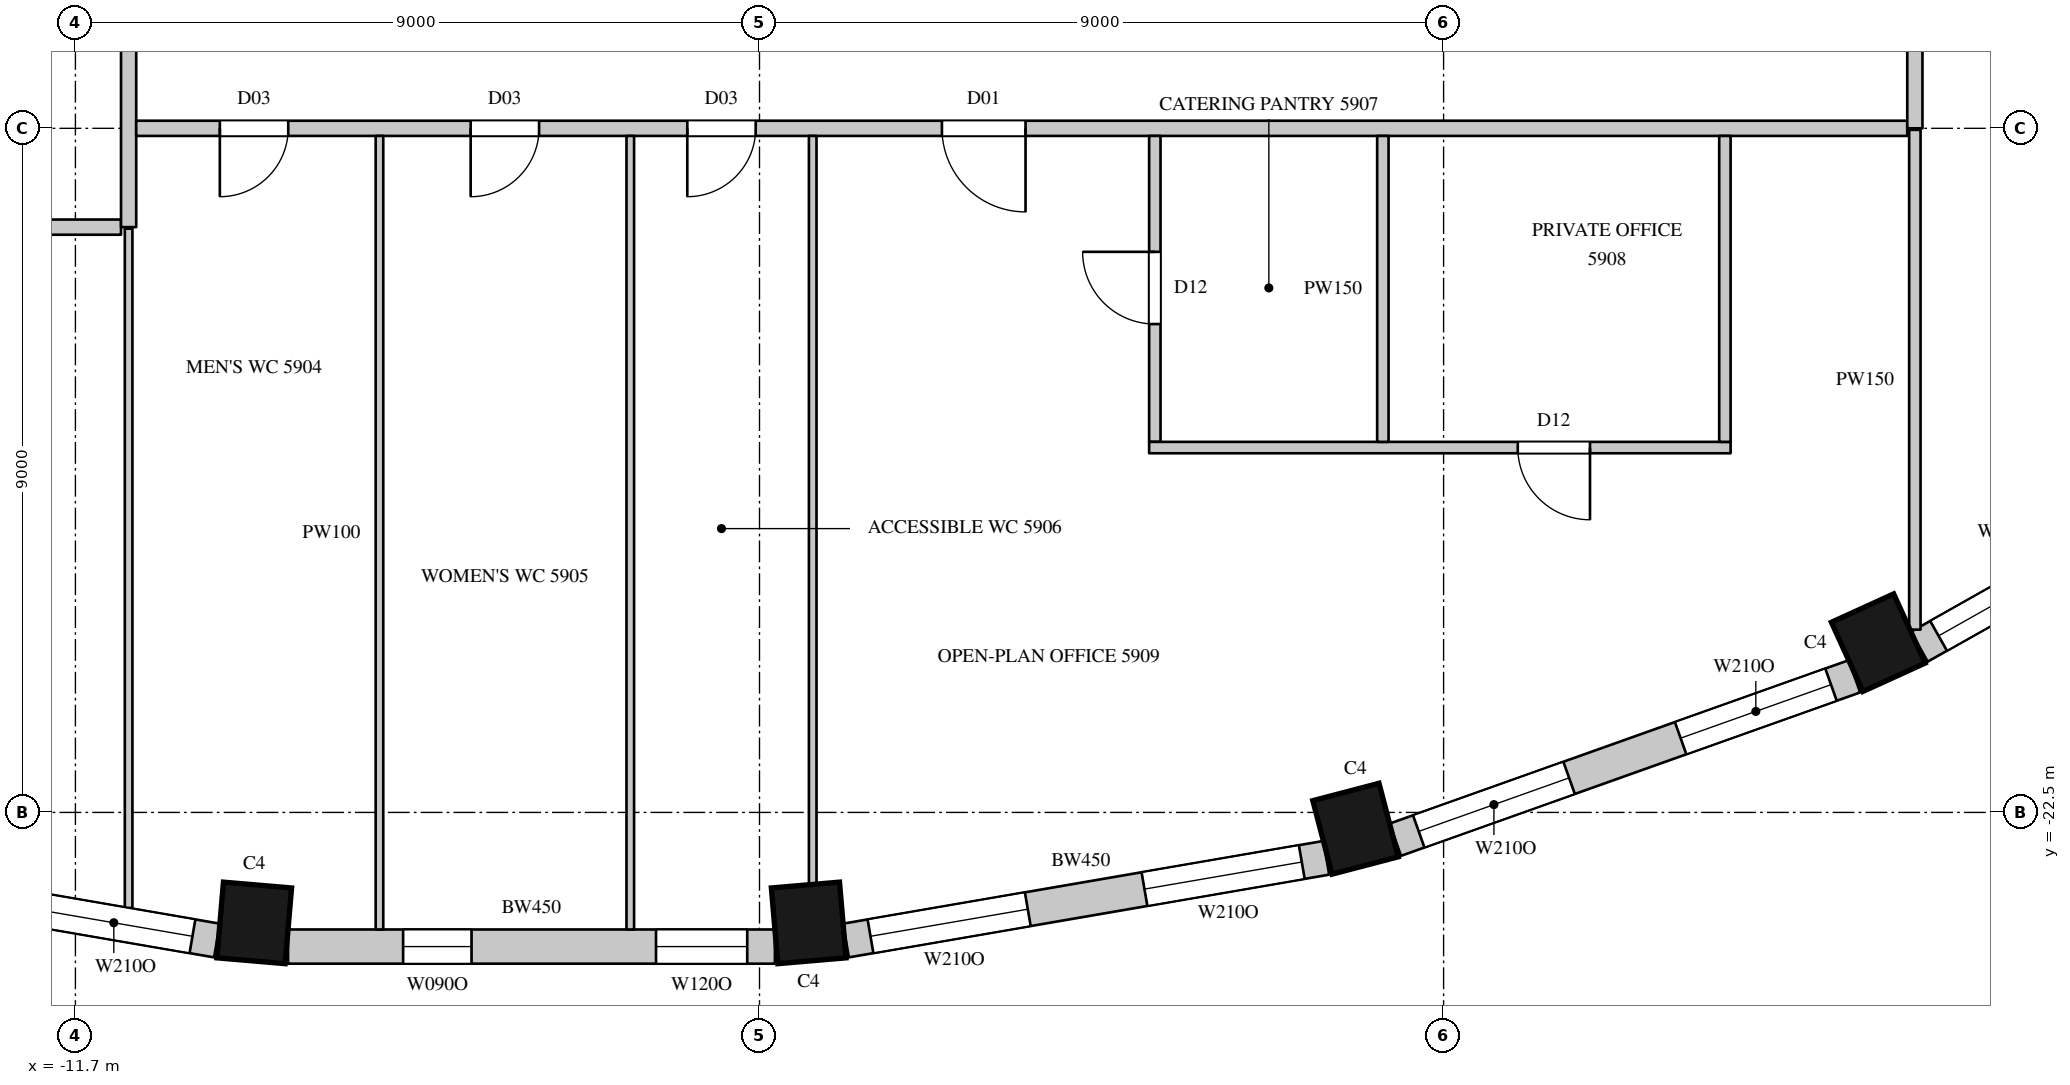
"""IFC4 building model, lengths in metres.
Left out: names, types, materials, properties, quantities, classifications, styles, units other than length and angle.
Written with IfcOpenShell. Run it as: python <this file> out.ifc"""

import sys

from ifc_helpers import new_model, si_unit, direction, frame, frame_2d, origin, origin_2d, place, context, subcontext, project, spatial, rectangle, extrude, element, fill, save


model = new_model("IFC4")
c1 = context("Model", 3, precision=1e-05, world=origin(), true_north=direction((0.0, 1.0)))
c2 = subcontext(c1, "Body", "Model", "MODEL_VIEW")
j1 = project(units=[si_unit("LENGTHUNIT", "METRE"), si_unit("PLANEANGLEUNIT", "RADIAN")], contexts=[c1])
p1 = place(None, origin())
s1 = spatial("IfcSite", under=j1, at=p1, CompositionType="ELEMENT")
p2 = place(p1, origin())
s2 = spatial("IfcBuilding", under=s1, at=p2, CompositionType="ELEMENT")
p3 = place(p2, frame((0.0, 0.0, 263.9)))
s3 = spatial("IfcBuildingStorey", under=s2, at=p3, CompositionType="ELEMENT", Elevation=263.9)
for number, where, z_axis, x_axis in (
    (1, (-9.347, -23.954, 0.0), (0.0, 0.0, 1.0), (0.996, -0.085, 0.0)),
    (2, (-2.053, -23.954, 0.0), (0.0, 0.0, 1.0), (0.996, 0.085, 0.0)),
    (3, (5.142, -22.715, 0.0), (0.0, 0.0, 1.0), (0.967, 0.253, 0.0)),
    (4, (12.019, -20.267, 0.0), (0.0, 0.0, 1.0), (0.91, 0.415, 0.0)),
):
    element("IfcColumn", number, at=place(p3, frame(where, z_axis=z_axis, x_axis=x_axis)), inside=s3, PredefinedType="COLUMN", context=c2, shape_type="SweptSolid", body=[
        extrude(rectangle(XDim=0.9, YDim=1.0, at=origin_2d()), origin(), (0.0, 0.0, 1.0), 4.1),
    ])
p4 = place(p3, frame((-16.157, -23.097, 0.0), z_axis=(0.0, 0.0, 1.0), x_axis=(0.985502073964, -0.169663379113, 0.0)))
e5 = element("IfcWall", 5, at=p4, inside=s3, PredefinedType="SOLIDWALL", context=c2, shape_type="SweptSolid", body=[
    extrude(rectangle(XDim=6.412, YDim=0.45, at=frame_2d((3.206, 0.0))), origin(), (0.0, 0.0, 1.0), 3.8),
])
p5 = place(p4, frame((0.327, 0.0, 1.05)))
e6 = element("IfcOpeningElement", 6, at=p5, cuts=e5, PredefinedType="OPENING", context=c2, shape_type="SweptSolid", body=[
    extrude(rectangle(XDim=2.1, YDim=2.4, at=frame_2d((1.05, 1.2))), frame((0.0, 0.235, 0.0), z_axis=(0.0, -1.0, 0.0), x_axis=(1.0, 0.0, 0.0)), (0.0, 0.0, 1.0), 0.47),
])
p6 = place(p4, frame((3.985, 0.0, 1.05)))
e7 = element("IfcOpeningElement", 7, at=p6, cuts=e5, PredefinedType="OPENING", context=c2, shape_type="SweptSolid", body=[
    extrude(rectangle(XDim=2.1, YDim=2.4, at=frame_2d((1.05, 1.2))), frame((0.0, 0.235, 0.0), z_axis=(0.0, -1.0, 0.0), x_axis=(1.0, 0.0, 0.0)), (0.0, 0.0, 1.0), 0.47),
])
p7 = place(p3, frame((-8.903, -24.265, 0.0), z_axis=(0.0, 0.0, 1.0), x_axis=(1.0, 0.0, 0.0)))
e8 = element("IfcWall", 8, at=p7, inside=s3, PredefinedType="SOLIDWALL", context=c2, shape_type="SweptSolid", body=[
    extrude(rectangle(XDim=6.406, YDim=0.45, at=frame_2d((3.203, 0.0))), origin(), (0.0, 0.0, 1.0), 3.8),
])
p8 = place(p7, frame((1.514, 0.0, 1.05)))
e9 = element("IfcOpeningElement", 9, at=p8, cuts=e8, PredefinedType="OPENING", context=c2, shape_type="SweptSolid", body=[
    extrude(rectangle(XDim=0.9, YDim=2.4, at=frame_2d((0.45, 1.2))), frame((0.0, 0.235, 0.0), z_axis=(0.0, -1.0, 0.0), x_axis=(1.0, 0.0, 0.0)), (0.0, 0.0, 1.0), 0.47),
])
p9 = place(p7, frame((4.841, 0.0, 1.05)))
e10 = element("IfcOpeningElement", 10, at=p9, cuts=e8, PredefinedType="OPENING", context=c2, shape_type="SweptSolid", body=[
    extrude(rectangle(XDim=1.2, YDim=2.4, at=frame_2d((0.6, 1.2))), frame((0.0, 0.235, 0.0), z_axis=(0.0, -1.0, 0.0), x_axis=(1.0, 0.0, 0.0)), (0.0, 0.0, 1.0), 0.47),
])
p10 = place(p3, frame((-1.562, -24.185, 0.0), z_axis=(0.0, 0.0, 1.0), x_axis=(0.985502073964, 0.169663379113, 0.0)))
e11 = element("IfcWall", 11, at=p10, inside=s3, PredefinedType="SOLIDWALL", context=c2, shape_type="SweptSolid", body=[
    extrude(rectangle(XDim=6.412, YDim=0.45, at=frame_2d((3.206, 0.0))), origin(), (0.0, 0.0, 1.0), 3.8),
])
p11 = place(p10, frame((0.327, 0.0, 1.05)))
e12 = element("IfcOpeningElement", 12, at=p11, cuts=e11, PredefinedType="OPENING", context=c2, shape_type="SweptSolid", body=[
    extrude(rectangle(XDim=2.1, YDim=2.4, at=frame_2d((1.05, 1.2))), frame((0.0, 0.235, 0.0), z_axis=(0.0, -1.0, 0.0), x_axis=(1.0, 0.0, 0.0)), (0.0, 0.0, 1.0), 0.47),
])
p12 = place(p10, frame((3.985, 0.0, 1.05)))
e13 = element("IfcOpeningElement", 13, at=p12, cuts=e11, PredefinedType="OPENING", context=c2, shape_type="SweptSolid", body=[
    extrude(rectangle(XDim=2.1, YDim=2.4, at=frame_2d((1.05, 1.2))), frame((0.0, 0.235, 0.0), z_axis=(0.0, -1.0, 0.0), x_axis=(1.0, 0.0, 0.0)), (0.0, 0.0, 1.0), 0.47),
])
p13 = place(p3, frame((5.665, -22.859, 0.0), z_axis=(0.0, 0.0, 1.0), x_axis=(0.942108340262, 0.335308626803, 0.0)))
e14 = element("IfcWall", 14, at=p13, inside=s3, PredefinedType="SOLIDWALL", context=c2, shape_type="SweptSolid", body=[
    extrude(rectangle(XDim=6.412, YDim=0.45, at=frame_2d((3.206, 0.0))), origin(), (0.0, 0.0, 1.0), 3.8),
])
p14 = place(p13, frame((0.327, 0.0, 1.05)))
e15 = element("IfcOpeningElement", 15, at=p14, cuts=e14, PredefinedType="OPENING", context=c2, shape_type="SweptSolid", body=[
    extrude(rectangle(XDim=2.1, YDim=2.4, at=frame_2d((1.05, 1.2))), frame((0.0, 0.235, 0.0), z_axis=(0.0, -1.0, 0.0), x_axis=(1.0, 0.0, 0.0)), (0.0, 0.0, 1.0), 0.47),
])
p15 = place(p13, frame((3.985, 0.0, 1.05)))
e16 = element("IfcOpeningElement", 16, at=p15, cuts=e14, PredefinedType="OPENING", context=c2, shape_type="SweptSolid", body=[
    extrude(rectangle(XDim=2.1, YDim=2.4, at=frame_2d((1.05, 1.2))), frame((0.0, 0.235, 0.0), z_axis=(0.0, -1.0, 0.0), x_axis=(1.0, 0.0, 0.0)), (0.0, 0.0, 1.0), 0.47),
])
p16 = place(p3, frame((12.559, -20.32, 0.0), z_axis=(0.0, 0.0, 1.0), x_axis=(0.871065783524, 0.491166367714, 0.0)))
e17 = element("IfcWall", 17, at=p16, inside=s3, PredefinedType="SOLIDWALL", context=c2, shape_type="SweptSolid", body=[
    extrude(rectangle(XDim=6.196, YDim=0.45, at=frame_2d((3.098, 0.0))), origin(), (0.0, 0.0, 1.0), 3.8),
])
p17 = place(p16, frame((0.291, 0.0, 1.05)))
e18 = element("IfcOpeningElement", 18, at=p17, cuts=e17, PredefinedType="OPENING", context=c2, shape_type="SweptSolid", body=[
    extrude(rectangle(XDim=2.1, YDim=2.4, at=frame_2d((1.05, 1.2))), frame((0.0, 0.235, 0.0), z_axis=(0.0, -1.0, 0.0), x_axis=(1.0, 0.0, 0.0)), (0.0, 0.0, 1.0), 0.47),
])
p18 = place(p16, frame((3.875, 0.0, 1.05)))
e19 = element("IfcOpeningElement", 19, at=p18, cuts=e17, PredefinedType="OPENING", context=c2, shape_type="SweptSolid", body=[
    extrude(rectangle(XDim=2.1, YDim=2.4, at=frame_2d((1.05, 1.2))), frame((0.0, 0.235, 0.0), z_axis=(0.0, -1.0, 0.0), x_axis=(1.0, 0.0, 0.0)), (0.0, 0.0, 1.0), 0.47),
])
p19 = place(p3, frame((-13.97, -14.8, 0.0), z_axis=(0.0, 0.0, 1.0), x_axis=(1.0, 0.0, 0.0)))
e20 = element("IfcWall", 20, at=p19, inside=s3, PredefinedType="PARTITIONING", context=c2, shape_type="SweptSolid", body=[
    extrude(rectangle(XDim=2.87, YDim=0.2, at=frame_2d((1.435, 0.0))), origin(), (0.0, 0.0, 1.0), 3.8),
])
p20 = place(p3, frame((-11.0, -14.8, 0.0), z_axis=(0.0, 0.0, 1.0), x_axis=(0.0, 1.0, 0.0)))
e21 = element("IfcWall", 21, at=p20, inside=s3, PredefinedType="PARTITIONING", context=c2, shape_type="SweptSolid", body=[
    extrude(rectangle(XDim=29.5, YDim=0.2, at=frame_2d((14.75, 0.0))), origin(), (0.0, 0.0, 1.0), 3.8),
])
p21 = place(p20, frame((14.05, 0.0, 0.0)))
e22 = element("IfcOpeningElement", 22, at=p21, cuts=e21, PredefinedType="OPENING", context=c2, shape_type="SweptSolid", body=[
    extrude(rectangle(XDim=1.5, YDim=2.4, at=frame_2d((0.75, 1.2))), frame((0.0, 0.11, 0.0), z_axis=(0.0, -1.0, 0.0), x_axis=(1.0, 0.0, 0.0)), (0.0, 0.0, 1.0), 0.22),
])
p22 = place(p3, frame((-10.9, -13.5, 0.0), z_axis=(0.0, 0.0, 1.0), x_axis=(1.0, 0.0, 0.0)))
e23 = element("IfcWall", 23, at=p22, inside=s3, PredefinedType="PARTITIONING", context=c2, shape_type="SweptSolid", body=[
    extrude(rectangle(XDim=23.3, YDim=0.2, at=frame_2d((11.65, 0.0))), origin(), (0.0, 0.0, 1.0), 3.8),
])
p23 = place(p22, frame((1.1, 0.0, 0.0)))
e24 = element("IfcOpeningElement", 24, at=p23, cuts=e23, PredefinedType="OPENING", context=c2, shape_type="SweptSolid", body=[
    extrude(rectangle(XDim=0.9, YDim=2.2, at=frame_2d((0.45, 1.1))), frame((0.0, 0.11, 0.0), z_axis=(0.0, -1.0, 0.0), x_axis=(1.0, 0.0, 0.0)), (0.0, 0.0, 1.0), 0.22),
])
p24 = place(p22, frame((4.4, 0.0, 0.0)))
e25 = element("IfcOpeningElement", 25, at=p24, cuts=e23, PredefinedType="OPENING", context=c2, shape_type="SweptSolid", body=[
    extrude(rectangle(XDim=0.9, YDim=2.2, at=frame_2d((0.45, 1.1))), frame((0.0, 0.11, 0.0), z_axis=(0.0, -1.0, 0.0), x_axis=(1.0, 0.0, 0.0)), (0.0, 0.0, 1.0), 0.22),
])
p25 = place(p22, frame((7.25, 0.0, 0.0)))
e26 = element("IfcOpeningElement", 26, at=p25, cuts=e23, PredefinedType="OPENING", context=c2, shape_type="SweptSolid", body=[
    extrude(rectangle(XDim=0.9, YDim=2.2, at=frame_2d((0.45, 1.1))), frame((0.0, 0.11, 0.0), z_axis=(0.0, -1.0, 0.0), x_axis=(1.0, 0.0, 0.0)), (0.0, 0.0, 1.0), 0.22),
])
p26 = place(p22, frame((10.6, 0.0, 0.0)))
e27 = element("IfcOpeningElement", 27, at=p26, cuts=e23, PredefinedType="OPENING", context=c2, shape_type="SweptSolid", body=[
    extrude(rectangle(XDim=1.1, YDim=2.4, at=frame_2d((0.55, 1.2))), frame((0.0, 0.11, 0.0), z_axis=(0.0, -1.0, 0.0), x_axis=(1.0, 0.0, 0.0)), (0.0, 0.0, 1.0), 0.22),
])
p27 = place(p3, frame((12.5, -13.5, 0.0), z_axis=(0.0, 0.0, 1.0), x_axis=(0.0, 1.0, 0.0)))
e28 = element("IfcWall", 28, at=p27, inside=s3, PredefinedType="PARTITIONING", context=c2, shape_type="SweptSolid", body=[
    extrude(rectangle(XDim=26.9, YDim=0.2, at=frame_2d((13.45, 0.0))), origin(), (0.0, 0.0, 1.0), 3.8),
])
p28 = place(p27, frame((12.75, 0.0, 0.0)))
e29 = element("IfcOpeningElement", 29, at=p28, cuts=e28, PredefinedType="OPENING", context=c2, shape_type="SweptSolid", body=[
    extrude(rectangle(XDim=1.5, YDim=2.4, at=frame_2d((0.75, 1.2))), frame((0.0, 0.11, 0.0), z_axis=(0.0, -1.0, 0.0), x_axis=(1.0, 0.0, 0.0)), (0.0, 0.0, 1.0), 0.22),
])
p29 = place(p3, frame((2.501, -17.625, 0.0), z_axis=(0.0, 0.0, 1.0), x_axis=(0.0, 1.0, 0.0)))
e30 = element("IfcWall", 30, at=p29, inside=s3, PredefinedType="PARTITIONING", context=c2, shape_type="SweptSolid", body=[
    extrude(rectangle(XDim=4.025, YDim=0.15, at=frame_2d((2.012, 0.0))), origin(), (0.0, 0.0, 1.0), 3.8),
])
p30 = place(p29, frame((1.55, 0.0, 0.0)))
e31 = element("IfcOpeningElement", 31, at=p30, cuts=e30, PredefinedType="OPENING", context=c2, shape_type="SweptSolid", body=[
    extrude(rectangle(XDim=0.95, YDim=2.2, at=frame_2d((0.475, 1.1))), frame((0.0, 0.085, 0.0), z_axis=(0.0, -1.0, 0.0), x_axis=(1.0, 0.0, 0.0)), (0.0, 0.0, 1.0), 0.17),
])
p31 = place(p3, frame((2.426, -17.7, 0.0), z_axis=(0.0, 0.0, 1.0), x_axis=(1.0, 0.0, 0.0)))
e32 = element("IfcWall", 32, at=p31, inside=s3, PredefinedType="PARTITIONING", context=c2, shape_type="SweptSolid", body=[
    extrude(rectangle(XDim=7.65, YDim=0.15, at=frame_2d((3.825, 0.0))), origin(), (0.0, 0.0, 1.0), 3.8),
])
p32 = place(p31, frame((4.85, 0.0, 0.0)))
e33 = element("IfcOpeningElement", 33, at=p32, cuts=e32, PredefinedType="OPENING", context=c2, shape_type="SweptSolid", body=[
    extrude(rectangle(XDim=0.95, YDim=2.2, at=frame_2d((0.475, 1.1))), frame((0.0, 0.085, 0.0), z_axis=(0.0, -1.0, 0.0), x_axis=(1.0, 0.0, 0.0)), (0.0, 0.0, 1.0), 0.17),
])
for number, where, z_axis, x_axis in (
    (34, (5.501, -17.625, 0.0), (0.0, 0.0, 1.0), (0.0, 1.0, 0.0)),
    (35, (10.001, -17.625, 0.0), (0.0, 0.0, 1.0), (0.0, 1.0, 0.0)),
):
    element("IfcWall", number, at=place(p3, frame(where, z_axis=z_axis, x_axis=x_axis)), inside=s3, PredefinedType="PARTITIONING", context=c2, shape_type="SweptSolid", body=[
        extrude(rectangle(XDim=4.025, YDim=0.15, at=frame_2d((2.012, 0.0))), origin(), (0.0, 0.0, 1.0), 3.8),
    ])
p33 = place(p3, frame((12.5, -20.095, 0.0), z_axis=(0.0, 0.0, 1.0), x_axis=(0.0, 1.0, 0.0)))
e36 = element("IfcWall", 36, at=p33, inside=s3, PredefinedType="PARTITIONING", context=c2, shape_type="SweptSolid", body=[
    extrude(rectangle(XDim=6.575, YDim=0.15, at=frame_2d((3.288, 0.0))), origin(), (0.0, 0.0, 1.0), 3.8),
])
p34 = place(p3, frame((-11.0, -23.757, 0.0), z_axis=(0.0, 0.0, 1.0), x_axis=(0.0, 1.0, 0.0)))
e37 = element("IfcWall", 37, at=p34, inside=s3, PredefinedType="PARTITIONING", context=c2, shape_type="SweptSolid", body=[
    extrude(rectangle(XDim=8.937, YDim=0.1, at=frame_2d((4.468, 0.0))), origin(), (0.0, 0.0, 1.0), 3.8),
])
for number, where, z_axis, x_axis in (
    (38, (-7.7, -24.04, 0.0), (0.0, 0.0, 1.0), (0.0, 1.0, 0.0)),
    (39, (-4.4, -24.04, 0.0), (0.0, 0.0, 1.0), (0.0, 1.0, 0.0)),
):
    element("IfcWall", number, at=place(p3, frame(where, z_axis=z_axis, x_axis=x_axis)), inside=s3, PredefinedType="PARTITIONING", context=c2, shape_type="SweptSolid", body=[
        extrude(rectangle(XDim=10.44, YDim=0.1, at=frame_2d((5.22, 0.0))), origin(), (0.0, 0.0, 1.0), 3.8),
    ])
p35 = place(p3, frame((-2.0, -23.447, 0.0), z_axis=(0.0, 0.0, 1.0), x_axis=(0.0, 1.0, 0.0)))
e40 = element("IfcWall", 40, at=p35, inside=s3, PredefinedType="PARTITIONING", context=c2, shape_type="SweptSolid", body=[
    extrude(rectangle(XDim=9.847, YDim=0.1, at=frame_2d((4.924, 0.0))), origin(), (0.0, 0.0, 1.0), 3.8),
])
p36 = place(p6, origin())
e41 = element("IfcWindow", 41, at=p36, inside=s3, PartitioningType="SINGLE_PANEL", PredefinedType="WINDOW", context=c2, shape_type="SweptSolid", body=[
    extrude(rectangle(XDim=2.1, YDim=2.4, at=frame_2d((1.05, 1.2))), frame((0.0, 0.135, 0.0), z_axis=(0.0, -1.0, 0.0), x_axis=(1.0, 0.0, 0.0)), (0.0, 0.0, 1.0), 0.06),
])
fill(e7, e41)
p37 = place(p11, origin())
e42 = element("IfcWindow", 42, at=p37, inside=s3, PartitioningType="SINGLE_PANEL", PredefinedType="WINDOW", context=c2, shape_type="SweptSolid", body=[
    extrude(rectangle(XDim=2.1, YDim=2.4, at=frame_2d((1.05, 1.2))), frame((0.0, 0.135, 0.0), z_axis=(0.0, -1.0, 0.0), x_axis=(1.0, 0.0, 0.0)), (0.0, 0.0, 1.0), 0.06),
])
fill(e12, e42)
p38 = place(p12, origin())
e43 = element("IfcWindow", 43, at=p38, inside=s3, PartitioningType="SINGLE_PANEL", PredefinedType="WINDOW", context=c2, shape_type="SweptSolid", body=[
    extrude(rectangle(XDim=2.1, YDim=2.4, at=frame_2d((1.05, 1.2))), frame((0.0, 0.135, 0.0), z_axis=(0.0, -1.0, 0.0), x_axis=(1.0, 0.0, 0.0)), (0.0, 0.0, 1.0), 0.06),
])
fill(e13, e43)
p39 = place(p14, origin())
e44 = element("IfcWindow", 44, at=p39, inside=s3, PartitioningType="SINGLE_PANEL", PredefinedType="WINDOW", context=c2, shape_type="SweptSolid", body=[
    extrude(rectangle(XDim=2.1, YDim=2.4, at=frame_2d((1.05, 1.2))), frame((0.0, 0.135, 0.0), z_axis=(0.0, -1.0, 0.0), x_axis=(1.0, 0.0, 0.0)), (0.0, 0.0, 1.0), 0.06),
])
fill(e15, e44)
p40 = place(p15, origin())
e45 = element("IfcWindow", 45, at=p40, inside=s3, PartitioningType="SINGLE_PANEL", PredefinedType="WINDOW", context=c2, shape_type="SweptSolid", body=[
    extrude(rectangle(XDim=2.1, YDim=2.4, at=frame_2d((1.05, 1.2))), frame((0.0, 0.135, 0.0), z_axis=(0.0, -1.0, 0.0), x_axis=(1.0, 0.0, 0.0)), (0.0, 0.0, 1.0), 0.06),
])
fill(e16, e45)
p41 = place(p17, origin())
e46 = element("IfcWindow", 46, at=p41, inside=s3, PartitioningType="SINGLE_PANEL", PredefinedType="WINDOW", context=c2, shape_type="SweptSolid", body=[
    extrude(rectangle(XDim=2.1, YDim=2.4, at=frame_2d((1.05, 1.2))), frame((0.0, 0.135, 0.0), z_axis=(0.0, -1.0, 0.0), x_axis=(1.0, 0.0, 0.0)), (0.0, 0.0, 1.0), 0.06),
])
fill(e18, e46)
p42 = place(p23, origin())
e47 = element("IfcDoor", 47, at=p42, inside=s3, OperationType="SINGLE_SWING_RIGHT", PredefinedType="DOOR", context=c2, shape_type="SweptSolid", body=[
    extrude(rectangle(XDim=0.9, YDim=2.2, at=frame_2d((0.45, 1.1))), frame((0.0, 0.025, 0.0), z_axis=(0.0, -1.0, 0.0), x_axis=(1.0, 0.0, 0.0)), (0.0, 0.0, 1.0), 0.05),
])
fill(e24, e47)
p43 = place(p24, origin())
e48 = element("IfcDoor", 48, at=p43, inside=s3, OperationType="SINGLE_SWING_RIGHT", PredefinedType="DOOR", context=c2, shape_type="SweptSolid", body=[
    extrude(rectangle(XDim=0.9, YDim=2.2, at=frame_2d((0.45, 1.1))), frame((0.0, 0.025, 0.0), z_axis=(0.0, -1.0, 0.0), x_axis=(1.0, 0.0, 0.0)), (0.0, 0.0, 1.0), 0.05),
])
fill(e25, e48)
p44 = place(p25, origin())
e49 = element("IfcDoor", 49, at=p44, inside=s3, OperationType="SINGLE_SWING_RIGHT", PredefinedType="DOOR", context=c2, shape_type="SweptSolid", body=[
    extrude(rectangle(XDim=0.9, YDim=2.2, at=frame_2d((0.45, 1.1))), frame((0.0, 0.025, 0.0), z_axis=(0.0, -1.0, 0.0), x_axis=(1.0, 0.0, 0.0)), (0.0, 0.0, 1.0), 0.05),
])
fill(e26, e49)
p45 = place(p26, origin())
e50 = element("IfcDoor", 50, at=p45, inside=s3, OperationType="SINGLE_SWING_LEFT", PredefinedType="DOOR", context=c2, shape_type="SweptSolid", body=[
    extrude(rectangle(XDim=1.1, YDim=2.4, at=frame_2d((0.55, 1.2))), frame((0.0, 0.025, 0.0), z_axis=(0.0, -1.0, 0.0), x_axis=(1.0, 0.0, 0.0)), (0.0, 0.0, 1.0), 0.05),
])
fill(e27, e50)
p46 = place(p30, origin())
e51 = element("IfcDoor", 51, at=p46, inside=s3, OperationType="SINGLE_SWING_RIGHT", PredefinedType="DOOR", context=c2, shape_type="SweptSolid", body=[
    extrude(rectangle(XDim=0.95, YDim=2.2, at=frame_2d((0.475, 1.1))), frame((0.0, 0.025, 0.0), z_axis=(0.0, -1.0, 0.0), x_axis=(1.0, 0.0, 0.0)), (0.0, 0.0, 1.0), 0.05),
])
fill(e31, e51)
p47 = place(p32, origin())
e52 = element("IfcDoor", 52, at=p47, inside=s3, OperationType="SINGLE_SWING_LEFT", PredefinedType="DOOR", context=c2, shape_type="SweptSolid", body=[
    extrude(rectangle(XDim=0.95, YDim=2.2, at=frame_2d((0.475, 1.1))), frame((0.0, 0.025, 0.0), z_axis=(0.0, -1.0, 0.0), x_axis=(1.0, 0.0, 0.0)), (0.0, 0.0, 1.0), 0.05),
])
fill(e33, e52)
p48 = place(p8, origin())
e53 = element("IfcWindow", 53, at=p48, inside=s3, PartitioningType="SINGLE_PANEL", PredefinedType="WINDOW", context=c2, shape_type="SweptSolid", body=[
    extrude(rectangle(XDim=0.9, YDim=2.4, at=frame_2d((0.45, 1.2))), frame((0.0, 0.135, 0.0), z_axis=(0.0, -1.0, 0.0), x_axis=(1.0, 0.0, 0.0)), (0.0, 0.0, 1.0), 0.06),
])
fill(e9, e53)
p49 = place(p9, origin())
e54 = element("IfcWindow", 54, at=p49, inside=s3, PartitioningType="SINGLE_PANEL", PredefinedType="WINDOW", context=c2, shape_type="SweptSolid", body=[
    extrude(rectangle(XDim=1.2, YDim=2.4, at=frame_2d((0.6, 1.2))), frame((0.0, 0.135, 0.0), z_axis=(0.0, -1.0, 0.0), x_axis=(1.0, 0.0, 0.0)), (0.0, 0.0, 1.0), 0.06),
])
fill(e10, e54)
save(model, sys.argv[1])
